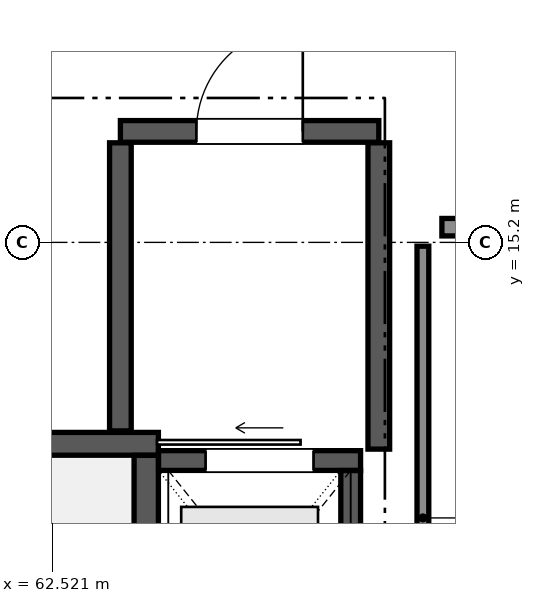
"""IFC4 building model, lengths in metres.
Left out: names, types, materials, properties, quantities, classifications, styles, units other than length and angle.
Written with IfcOpenShell. Run it as: python <this file> out.ifc"""

import sys

from ifc_helpers import new_model, si_unit, direction, frame, frame_2d, origin, place, context, subcontext, project, spatial, rectangle, extrude, element, fill, save


model = new_model("IFC4")
c1 = context("Model", 3, precision=1e-05, world=origin(), true_north=direction((0.0, 1.0)))
c2 = subcontext(c1, "Body", "Model", "MODEL_VIEW")
j1 = project(units=[si_unit("LENGTHUNIT", "METRE"), si_unit("PLANEANGLEUNIT", "RADIAN")], contexts=[c1])
p1 = place(None, origin())
s1 = spatial("IfcSite", under=j1, at=p1, CompositionType="ELEMENT")
p2 = place(p1, origin())
s2 = spatial("IfcBuilding", under=s1, at=p2, CompositionType="ELEMENT")
p3 = place(p2, frame((0.0, 0.0, 13.6)))
s3 = spatial("IfcBuildingStorey", under=s2, at=p3, CompositionType="ELEMENT", Elevation=13.6)
p4 = place(p3, frame((55.5, 12.55, 0.0), z_axis=(0.0, 0.0, 1.0), x_axis=(1.0, 0.0, 0.0)))
e1 = element("IfcWall", 1, at=p4, inside=s3, PredefinedType="SHEAR", context=c2, shape_type="SweptSolid", body=[
    extrude(rectangle(XDim=8.42, YDim=0.3, at=frame_2d((4.21, 0.0))), origin(), (0.0, 0.0, 1.0), 3.78),
])
p5 = place(p4, frame((0.55, 0.0, 0.0)))
e2 = element("IfcOpeningElement", 2, at=p5, cuts=e1, PredefinedType="OPENING", context=c2, shape_type="SweptSolid", body=[
    extrude(rectangle(XDim=1.2, YDim=2.2, at=frame_2d((0.6, 1.1))), frame((0.0, 0.16, 0.0), z_axis=(0.0, -1.0, 0.0), x_axis=(1.0, 0.0, 0.0)), (0.0, 0.0, 1.0), 0.32),
])
p6 = place(p3, frame((63.76, 9.002, 0.0), z_axis=(0.0, 0.0, 1.0), x_axis=(0.0, 1.0, 0.0)))
e3 = element("IfcWall", 3, at=p6, inside=s3, PredefinedType="SHEAR", context=c2, shape_type="SweptSolid", body=[
    extrude(rectangle(XDim=3.396, YDim=0.32, at=frame_2d((1.698, 0.0))), origin(), (0.0, 0.0, 1.0), 3.78),
])
p7 = place(p3, frame((63.922, 12.33, 0.0), z_axis=(0.0, 0.0, 1.0), x_axis=(1.0, 0.0, 0.0)))
e4 = element("IfcWall", 4, at=p7, inside=s3, PredefinedType="SHEAR", context=c2, shape_type="SweptSolid", body=[
    extrude(rectangle(XDim=2.658, YDim=0.26, at=frame_2d((1.329, 0.0))), origin(), (0.0, 0.0, 1.0), 3.78),
])
p8 = place(p7, frame((0.619, 0.0, 0.0)))
e5 = element("IfcOpeningElement", 5, at=p8, cuts=e4, PredefinedType="OPENING", context=c2, shape_type="SweptSolid", body=[
    extrude(rectangle(XDim=1.42, YDim=2.25, at=frame_2d((0.71, 1.125))), frame((0.0, 0.14, 0.0), z_axis=(0.0, -1.0, 0.0), x_axis=(1.0, 0.0, 0.0)), (0.0, 0.0, 1.0), 0.28),
])
p9 = place(p3, frame((66.45, 9.202, 0.0), z_axis=(0.0, 0.0, 1.0), x_axis=(0.0, 1.0, 0.0)))
e6 = element("IfcWall", 6, at=p9, inside=s3, PredefinedType="SHEAR", context=c2, shape_type="SweptSolid", body=[
    extrude(rectangle(XDim=2.996, YDim=0.26, at=frame_2d((1.498, 0.0))), origin(), (0.0, 0.0, 1.0), 3.78),
])
p10 = place(p3, frame((63.42, 16.66, 0.0), z_axis=(0.0, 0.0, 1.0), x_axis=(1.0, 0.0, 0.0)))
e7 = element("IfcWall", 7, at=p10, inside=s3, PredefinedType="SHEAR", context=c2, shape_type="SweptSolid", body=[
    extrude(rectangle(XDim=3.4, YDim=0.285, at=frame_2d((1.7, 0.0))), origin(), (0.0, 0.0, 1.0), 3.78),
])
p11 = place(p10, frame((1.0, 0.0, 0.0)))
e8 = element("IfcOpeningElement", 8, at=p11, cuts=e7, PredefinedType="OPENING", context=c2, shape_type="SweptSolid", body=[
    extrude(rectangle(XDim=1.4, YDim=2.25, at=frame_2d((0.7, 1.125))), frame((0.0, 0.152, 0.0), z_axis=(0.0, -1.0, 0.0), x_axis=(1.0, 0.0, 0.0)), (0.0, 0.0, 1.0), 0.305),
])
p12 = place(p3, frame((63.42, 12.72, 0.0), z_axis=(0.0, 0.0, 1.0), x_axis=(0.0, 1.0, 0.0)))
e9 = element("IfcWall", 9, at=p12, inside=s3, PredefinedType="SHEAR", context=c2, shape_type="SweptSolid", body=[
    extrude(rectangle(XDim=3.79, YDim=0.285, at=frame_2d((1.895, 0.0))), origin(), (0.0, 0.0, 1.0), 3.03),
])
p13 = place(p3, frame((66.82, 12.48, 0.0), z_axis=(0.0, 0.0, 1.0), x_axis=(0.0, 1.0, 0.0)))
e10 = element("IfcWall", 10, at=p13, inside=s3, PredefinedType="SHEAR", context=c2, shape_type="SweptSolid", body=[
    extrude(rectangle(XDim=4.03, YDim=0.285, at=frame_2d((2.015, 0.0))), origin(), (0.0, 0.0, 1.0), 3.03),
])
p14 = place(p3, frame((67.4, 8.0, 0.0), z_axis=(0.0, 0.0, 1.0), x_axis=(0.0, 1.0, 0.0)))
e11 = element("IfcWall", 11, at=p14, inside=s3, PredefinedType="PARTITIONING", context=c2, shape_type="SweptSolid", body=[
    extrude(rectangle(XDim=7.15, YDim=0.155, at=frame_2d((3.575, 0.0))), origin(), (0.0, 0.0, 1.0), 3.03),
])
p15 = place(p3, frame((67.65, 15.4, 0.0), z_axis=(0.0, 0.0, 1.0), x_axis=(1.0, 0.0, 0.0)))
e12 = element("IfcWall", 12, at=p15, inside=s3, PredefinedType="PARTITIONING", context=c2, shape_type="SweptSolid", body=[
    extrude(rectangle(XDim=6.767, YDim=0.23, at=frame_2d((3.384, 0.0))), origin(), (0.0, 0.0, 1.0), 2.98),
])
p16 = place(p15, frame((2.683, 0.0, 0.0)))
e13 = element("IfcOpeningElement", 13, at=p16, cuts=e12, PredefinedType="OPENING", context=c2, shape_type="SweptSolid", body=[
    extrude(rectangle(XDim=1.4, YDim=2.2, at=frame_2d((0.7, 1.1))), frame((0.0, 0.125, 0.0), z_axis=(0.0, -1.0, 0.0), x_axis=(1.0, 0.0, 0.0)), (0.0, 0.0, 1.0), 0.25),
])
p17 = place(p8, origin())
e14 = element("IfcDoor", 14, at=p17, inside=s3, OperationType="SLIDING_TO_LEFT", PredefinedType="DOOR", context=c2, shape_type="SweptSolid", body=[
    extrude(rectangle(XDim=1.42, YDim=2.25, at=frame_2d((0.71, 1.125))), frame((0.0, 0.025, 0.0), z_axis=(0.0, -1.0, 0.0), x_axis=(1.0, 0.0, 0.0)), (0.0, 0.0, 1.0), 0.05),
])
fill(e5, e14)
p18 = place(p11, origin())
e15 = element("IfcDoor", 15, at=p18, inside=s3, OperationType="SINGLE_SWING_RIGHT", PredefinedType="DOOR", context=c2, shape_type="SweptSolid", body=[
    extrude(rectangle(XDim=1.4, YDim=2.25, at=frame_2d((0.7, 1.125))), frame((0.0, 0.025, 0.0), z_axis=(0.0, -1.0, 0.0), x_axis=(1.0, 0.0, 0.0)), (0.0, 0.0, 1.0), 0.05),
])
fill(e8, e15)
save(model, sys.argv[1])
